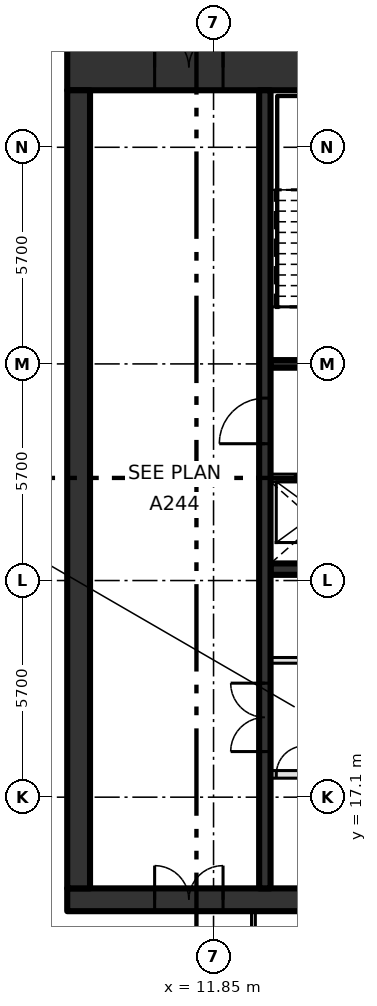
"""IFC4 building model, lengths in metres.
Left out: names, types, materials, properties, quantities, classifications, styles, units other than length and angle.
Written with IfcOpenShell. Run it as: python <this file> out.ifc"""

import sys

from ifc_helpers import new_model, si_unit, direction, frame, frame_2d, origin, place, context, subcontext, project, spatial, rectangle, extrude, element, fill, save


model = new_model("IFC4")
c1 = context("Model", 3, precision=1e-05, world=origin(), true_north=direction((0.0, 1.0)))
c2 = subcontext(c1, "Body", "Model", "MODEL_VIEW")
j1 = project(units=[si_unit("LENGTHUNIT", "METRE"), si_unit("PLANEANGLEUNIT", "RADIAN")], contexts=[c1])
p1 = place(None, origin())
s1 = spatial("IfcSite", under=j1, at=p1, CompositionType="ELEMENT")
p2 = place(p1, origin())
s2 = spatial("IfcBuilding", under=s1, at=p2, CompositionType="ELEMENT")
p3 = place(p2, frame((0.0, 0.0, 340.2)))
s3 = spatial("IfcBuildingStorey", under=s2, at=p3, CompositionType="ELEMENT", Elevation=340.2)
p4 = place(p3, frame((8.0, 14.4, -0.3), z_axis=(0.0, 0.0, 1.0), x_axis=(1.0, 0.0, 0.0)))
e1 = element("IfcWall", 1, at=p4, inside=s3, PredefinedType="SHEAR", context=c2, shape_type="SweptSolid", body=[
    extrude(rectangle(XDim=22.8, YDim=0.6, at=frame_2d((11.4, 0.0))), origin(), (0.0, 0.0, 1.0), 4.2),
])
p5 = place(p4, frame((2.3, 0.0, 0.3)))
e2 = element("IfcOpeningElement", 2, at=p5, cuts=e1, PredefinedType="OPENING", context=c2, shape_type="SweptSolid", body=[
    extrude(rectangle(XDim=1.8, YDim=2.1, at=frame_2d((0.9, 1.05))), frame((0.0, 0.31, 0.0), z_axis=(0.0, -1.0, 0.0), x_axis=(1.0, 0.0, 0.0)), (0.0, 0.0, 1.0), 0.62),
])
p6 = place(p3, frame((8.0, 36.3, -0.3), z_axis=(0.0, 0.0, 1.0), x_axis=(1.0, 0.0, 0.0)))
e3 = element("IfcWall", 3, at=p6, inside=s3, PredefinedType="SHEAR", context=c2, shape_type="SweptSolid", body=[
    extrude(rectangle(XDim=22.8, YDim=1.2, at=frame_2d((11.4, 0.0))), origin(), (0.0, 0.0, 1.0), 4.2),
])
p7 = place(p6, frame((2.3, 0.0, 0.3)))
e4 = element("IfcOpeningElement", 4, at=p7, cuts=e3, PredefinedType="OPENING", context=c2, shape_type="SweptSolid", body=[
    extrude(rectangle(XDim=1.8, YDim=2.1, at=frame_2d((0.9, 1.05))), frame((0.0, 0.61, 0.0), z_axis=(0.0, -1.0, 0.0), x_axis=(1.0, 0.0, 0.0)), (0.0, 0.0, 1.0), 1.22),
])
p8 = place(p3, frame((8.3, 14.7, -0.3), z_axis=(0.0, 0.0, 1.0), x_axis=(0.0, 1.0, 0.0)))
e5 = element("IfcWall", 5, at=p8, inside=s3, PredefinedType="SHEAR", context=c2, shape_type="SweptSolid", body=[
    extrude(rectangle(XDim=21.0, YDim=0.6, at=frame_2d((10.5, 0.0))), origin(), (0.0, 0.0, 1.0), 4.2),
])
p9 = place(p3, frame((13.35, 17.7, 0.0), z_axis=(0.0, 0.0, 1.0), x_axis=(1.0, 0.0, 0.0)))
e6 = element("IfcWall", 6, at=p9, inside=s3, PredefinedType="SOLIDWALL", context=c2, shape_type="SweptSolid", body=[
    extrude(rectangle(XDim=13.425, YDim=0.2, at=frame_2d((6.712, 0.0))), origin(), (0.0, 0.0, 1.0), 3.9),
])
p10 = place(p9, frame((2.0, 0.0, 0.0)))
e7 = element("IfcOpeningElement", 7, at=p10, cuts=e6, PredefinedType="OPENING", context=c2, shape_type="SweptSolid", body=[
    extrude(rectangle(XDim=1.1, YDim=2.1, at=frame_2d((0.55, 1.05))), frame((0.0, 0.11, 0.0), z_axis=(0.0, -1.0, 0.0), x_axis=(1.0, 0.0, 0.0)), (0.0, 0.0, 1.0), 0.22),
])
p11 = place(p9, frame((4.7, 0.0, 0.0)))
e8 = element("IfcOpeningElement", 8, at=p11, cuts=e6, PredefinedType="OPENING", context=c2, shape_type="SweptSolid", body=[
    extrude(rectangle(XDim=1.1, YDim=2.1, at=frame_2d((0.55, 1.05))), frame((0.0, 0.11, 0.0), z_axis=(0.0, -1.0, 0.0), x_axis=(1.0, 0.0, 0.0)), (0.0, 0.0, 1.0), 0.22),
])
p12 = place(p9, frame((7.4, 0.0, 0.0)))
e9 = element("IfcOpeningElement", 9, at=p12, cuts=e6, PredefinedType="OPENING", context=c2, shape_type="SweptSolid", body=[
    extrude(rectangle(XDim=1.1, YDim=2.1, at=frame_2d((0.55, 1.05))), frame((0.0, 0.11, 0.0), z_axis=(0.0, -1.0, 0.0), x_axis=(1.0, 0.0, 0.0)), (0.0, 0.0, 1.0), 0.22),
])
p13 = place(p9, frame((10.1, 0.0, 0.0)))
e10 = element("IfcOpeningElement", 10, at=p13, cuts=e6, PredefinedType="OPENING", context=c2, shape_type="SweptSolid", body=[
    extrude(rectangle(XDim=1.1, YDim=2.1, at=frame_2d((0.55, 1.05))), frame((0.0, 0.11, 0.0), z_axis=(0.0, -1.0, 0.0), x_axis=(1.0, 0.0, 0.0)), (0.0, 0.0, 1.0), 0.22),
])
p14 = place(p9, frame((0.15, 0.0, 0.0)))
e11 = element("IfcOpeningElement", 11, at=p14, cuts=e6, PredefinedType="OPENING", context=c2, shape_type="SweptSolid", body=[
    extrude(rectangle(XDim=0.75, YDim=2.1, at=frame_2d((0.375, 1.05))), frame((0.0, 0.11, 0.0), z_axis=(0.0, -1.0, 0.0), x_axis=(1.0, 0.0, 0.0)), (0.0, 0.0, 1.0), 0.22),
])
p15 = place(p9, frame((12.3, 0.0, 0.0)))
e12 = element("IfcOpeningElement", 12, at=p15, cuts=e6, PredefinedType="OPENING", context=c2, shape_type="SweptSolid", body=[
    extrude(rectangle(XDim=0.75, YDim=2.1, at=frame_2d((0.375, 1.05))), frame((0.0, 0.11, 0.0), z_axis=(0.0, -1.0, 0.0), x_axis=(1.0, 0.0, 0.0)), (0.0, 0.0, 1.0), 0.22),
])
p16 = place(p3, frame((13.35, 20.7, 0.0), z_axis=(0.0, 0.0, 1.0), x_axis=(1.0, 0.0, 0.0)))
e13 = element("IfcWall", 13, at=p16, inside=s3, PredefinedType="PARTITIONING", context=c2, shape_type="SweptSolid", body=[
    extrude(rectangle(XDim=13.425, YDim=0.15, at=frame_2d((6.712, 0.0))), origin(), (0.0, 0.0, 1.0), 3.9),
])
p17 = place(p16, frame((4.8, 0.0, 0.0)))
e14 = element("IfcOpeningElement", 14, at=p17, cuts=e13, PredefinedType="OPENING", context=c2, shape_type="SweptSolid", body=[
    extrude(rectangle(XDim=0.9, YDim=2.1, at=frame_2d((0.45, 1.05))), frame((0.0, 0.085, 0.0), z_axis=(0.0, -1.0, 0.0), x_axis=(1.0, 0.0, 0.0)), (0.0, 0.0, 1.0), 0.17),
])
p18 = place(p16, frame((11.55, 0.0, 0.0)))
e15 = element("IfcOpeningElement", 15, at=p18, cuts=e13, PredefinedType="OPENING", context=c2, shape_type="SweptSolid", body=[
    extrude(rectangle(XDim=0.9, YDim=2.1, at=frame_2d((0.45, 1.05))), frame((0.0, 0.085, 0.0), z_axis=(0.0, -1.0, 0.0), x_axis=(1.0, 0.0, 0.0)), (0.0, 0.0, 1.0), 0.17),
])
p19 = place(p3, frame((13.35, 23.1, 0.0), z_axis=(0.0, 0.0, 1.0), x_axis=(1.0, 0.0, 0.0)))
e16 = element("IfcWall", 16, at=p19, inside=s3, PredefinedType="SHEAR", context=c2, shape_type="SweptSolid", body=[
    extrude(rectangle(XDim=16.85, YDim=0.3, at=frame_2d((8.425, 0.0))), origin(), (0.0, 0.0, 1.0), 3.9),
])
p20 = place(p3, frame((13.35, 25.5, 0.0), z_axis=(0.0, 0.0, 1.0), x_axis=(1.0, 0.0, 0.0)))
e17 = element("IfcWall", 17, at=p20, inside=s3, PredefinedType="SOLIDWALL", context=c2, shape_type="SweptSolid", body=[
    extrude(rectangle(XDim=16.85, YDim=0.2, at=frame_2d((8.425, 0.0))), origin(), (0.0, 0.0, 1.0), 3.9),
])
p21 = place(p20, frame((0.65, 0.0, 0.0)))
e18 = element("IfcOpeningElement", 18, at=p21, cuts=e17, PredefinedType="OPENING", context=c2, shape_type="SweptSolid", body=[
    extrude(rectangle(XDim=1.1, YDim=2.1, at=frame_2d((0.55, 1.05))), frame((0.0, 0.11, 0.0), z_axis=(0.0, -1.0, 0.0), x_axis=(1.0, 0.0, 0.0)), (0.0, 0.0, 1.0), 0.22),
])
p22 = place(p20, frame((3.35, 0.0, 0.0)))
e19 = element("IfcOpeningElement", 19, at=p22, cuts=e17, PredefinedType="OPENING", context=c2, shape_type="SweptSolid", body=[
    extrude(rectangle(XDim=1.1, YDim=2.1, at=frame_2d((0.55, 1.05))), frame((0.0, 0.11, 0.0), z_axis=(0.0, -1.0, 0.0), x_axis=(1.0, 0.0, 0.0)), (0.0, 0.0, 1.0), 0.22),
])
p23 = place(p20, frame((6.05, 0.0, 0.0)))
e20 = element("IfcOpeningElement", 20, at=p23, cuts=e17, PredefinedType="OPENING", context=c2, shape_type="SweptSolid", body=[
    extrude(rectangle(XDim=1.1, YDim=2.1, at=frame_2d((0.55, 1.05))), frame((0.0, 0.11, 0.0), z_axis=(0.0, -1.0, 0.0), x_axis=(1.0, 0.0, 0.0)), (0.0, 0.0, 1.0), 0.22),
])
p24 = place(p20, frame((8.75, 0.0, 0.0)))
e21 = element("IfcOpeningElement", 21, at=p24, cuts=e17, PredefinedType="OPENING", context=c2, shape_type="SweptSolid", body=[
    extrude(rectangle(XDim=1.1, YDim=2.1, at=frame_2d((0.55, 1.05))), frame((0.0, 0.11, 0.0), z_axis=(0.0, -1.0, 0.0), x_axis=(1.0, 0.0, 0.0)), (0.0, 0.0, 1.0), 0.22),
])
p25 = place(p20, frame((13.0, 0.0, 0.0)))
e22 = element("IfcOpeningElement", 22, at=p25, cuts=e17, PredefinedType="OPENING", context=c2, shape_type="SweptSolid", body=[
    extrude(rectangle(XDim=0.9, YDim=2.1, at=frame_2d((0.45, 1.05))), frame((0.0, 0.11, 0.0), z_axis=(0.0, -1.0, 0.0), x_axis=(1.0, 0.0, 0.0)), (0.0, 0.0, 1.0), 0.22),
])
p26 = place(p3, frame((13.35, 28.5, 0.0), z_axis=(0.0, 0.0, 1.0), x_axis=(1.0, 0.0, 0.0)))
e23 = element("IfcWall", 23, at=p26, inside=s3, PredefinedType="SOLIDWALL", context=c2, shape_type="SweptSolid", body=[
    extrude(rectangle(XDim=6.75, YDim=0.2, at=frame_2d((3.375, 0.0))), origin(), (0.0, 0.0, 1.0), 3.9),
])
p27 = place(p26, frame((0.95, 0.0, 0.0)))
e24 = element("IfcOpeningElement", 24, at=p27, cuts=e23, PredefinedType="OPENING", context=c2, shape_type="SweptSolid", body=[
    extrude(rectangle(XDim=1.2, YDim=2.1, at=frame_2d((0.6, 1.05))), frame((0.0, 0.11, 0.0), z_axis=(0.0, -1.0, 0.0), x_axis=(1.0, 0.0, 0.0)), (0.0, 0.0, 1.0), 0.22),
])
p28 = place(p26, frame((3.75, 0.0, 0.0)))
e25 = element("IfcOpeningElement", 25, at=p28, cuts=e23, PredefinedType="OPENING", context=c2, shape_type="SweptSolid", body=[
    extrude(rectangle(XDim=1.1, YDim=2.1, at=frame_2d((0.55, 1.05))), frame((0.0, 0.11, 0.0), z_axis=(0.0, -1.0, 0.0), x_axis=(1.0, 0.0, 0.0)), (0.0, 0.0, 1.0), 0.22),
])
p29 = place(p3, frame((13.2, 14.7, 0.0), z_axis=(0.0, 0.0, 1.0), x_axis=(0.0, 1.0, 0.0)))
e26 = element("IfcWall", 26, at=p29, inside=s3, PredefinedType="SHEAR", context=c2, shape_type="SweptSolid", body=[
    extrude(rectangle(XDim=21.0, YDim=0.3, at=frame_2d((10.5, 0.0))), origin(), (0.0, 0.0, 1.0), 3.9),
])
p30 = place(p29, frame((3.6, 0.0, 0.0)))
e27 = element("IfcOpeningElement", 27, at=p30, cuts=e26, PredefinedType="OPENING", context=c2, shape_type="SweptSolid", body=[
    extrude(rectangle(XDim=1.8, YDim=2.1, at=frame_2d((0.9, 1.05))), frame((0.0, 0.16, 0.0), z_axis=(0.0, -1.0, 0.0), x_axis=(1.0, 0.0, 0.0)), (0.0, 0.0, 1.0), 0.32),
])
p31 = place(p29, frame((11.7, 0.0, 0.0)))
e28 = element("IfcOpeningElement", 28, at=p31, cuts=e26, PredefinedType="OPENING", context=c2, shape_type="SweptSolid", body=[
    extrude(rectangle(XDim=1.2, YDim=2.1, at=frame_2d((0.6, 1.05))), frame((0.0, 0.16, 0.0), z_axis=(0.0, -1.0, 0.0), x_axis=(1.0, 0.0, 0.0)), (0.0, 0.0, 1.0), 0.32),
])
p32 = place(p3, frame((12.9, 10.078, 0.0), z_axis=(0.0, 0.0, 1.0), x_axis=(0.0, 1.0, 0.0)))
e29 = element("IfcWall", 29, at=p32, inside=s3, PredefinedType="PARTITIONING", context=c2, shape_type="SweptSolid", body=[
    extrude(rectangle(XDim=4.022, YDim=0.1, at=frame_2d((2.011, 0.0))), origin(), (0.0, 0.0, 1.0), 3.9),
])
p33 = place(p32, frame((1.48, 0.0, 0.0)))
e30 = element("IfcOpeningElement", 30, at=p33, cuts=e29, PredefinedType="OPENING", context=c2, shape_type="SweptSolid", body=[
    extrude(rectangle(XDim=1.0, YDim=2.1, at=frame_2d((0.5, 1.05))), frame((0.0, 0.06, 0.0), z_axis=(0.0, -1.0, 0.0), x_axis=(1.0, 0.0, 0.0)), (0.0, 0.0, 1.0), 0.12),
])
p34 = place(p21, origin())
e31 = element("IfcDoor", 31, at=p34, inside=s3, OperationType="SLIDING_TO_LEFT", PredefinedType="DOOR", context=c2, shape_type="SweptSolid", body=[
    extrude(rectangle(XDim=1.1, YDim=2.1, at=frame_2d((0.55, 1.05))), frame((0.0, 0.025, 0.0), z_axis=(0.0, -1.0, 0.0), x_axis=(1.0, 0.0, 0.0)), (0.0, 0.0, 1.0), 0.05),
])
fill(e18, e31)
p35 = place(p14, origin())
e32 = element("IfcDoor", 32, at=p35, inside=s3, OperationType="SINGLE_SWING_RIGHT", PredefinedType="DOOR", context=c2, shape_type="SweptSolid", body=[
    extrude(rectangle(XDim=0.75, YDim=2.1, at=frame_2d((0.375, 1.05))), frame((0.0, 0.025, 0.0), z_axis=(0.0, -1.0, 0.0), x_axis=(1.0, 0.0, 0.0)), (0.0, 0.0, 1.0), 0.05),
])
fill(e11, e32)
p36 = place(p30, origin())
e33 = element("IfcDoor", 33, at=p36, inside=s3, OperationType="DOUBLE_DOOR_SINGLE_SWING", PredefinedType="DOOR", context=c2, shape_type="SweptSolid", body=[
    extrude(rectangle(XDim=1.8, YDim=2.1, at=frame_2d((0.9, 1.05))), frame((0.0, 0.025, 0.0), z_axis=(0.0, -1.0, 0.0), x_axis=(1.0, 0.0, 0.0)), (0.0, 0.0, 1.0), 0.05),
])
fill(e27, e33)
p37 = place(p31, origin())
e34 = element("IfcDoor", 34, at=p37, inside=s3, OperationType="SINGLE_SWING_LEFT", PredefinedType="DOOR", context=c2, shape_type="SweptSolid", body=[
    extrude(rectangle(XDim=1.2, YDim=2.1, at=frame_2d((0.6, 1.05))), frame((0.0, 0.025, 0.0), z_axis=(0.0, -1.0, 0.0), x_axis=(1.0, 0.0, 0.0)), (0.0, 0.0, 1.0), 0.05),
])
fill(e28, e34)
p38 = place(p7, origin())
e35 = element("IfcDoor", 35, at=p38, inside=s3, OperationType="DOUBLE_DOOR_SINGLE_SWING", PredefinedType="DOOR", context=c2, shape_type="SweptSolid", body=[
    extrude(rectangle(XDim=1.8, YDim=2.1, at=frame_2d((0.9, 1.05))), frame((0.0, 0.025, 0.0), z_axis=(0.0, -1.0, 0.0), x_axis=(1.0, 0.0, 0.0)), (0.0, 0.0, 1.0), 0.05),
])
fill(e4, e35)
p39 = place(p5, origin())
e36 = element("IfcDoor", 36, at=p39, inside=s3, OperationType="DOUBLE_DOOR_SINGLE_SWING", PredefinedType="DOOR", context=c2, shape_type="SweptSolid", body=[
    extrude(rectangle(XDim=1.8, YDim=2.1, at=frame_2d((0.9, 1.05))), frame((0.0, 0.025, 0.0), z_axis=(0.0, -1.0, 0.0), x_axis=(1.0, 0.0, 0.0)), (0.0, 0.0, 1.0), 0.05),
])
fill(e2, e36)
save(model, sys.argv[1])
